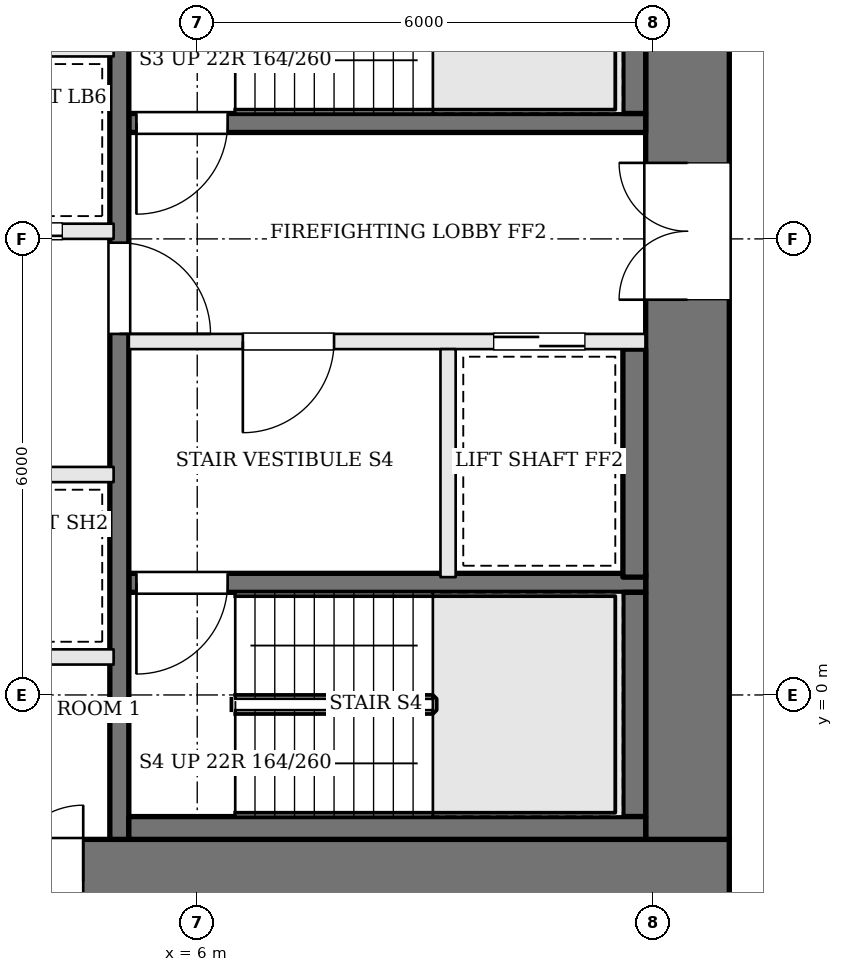
"""IFC4 building model, lengths in metres.
Left out: names, types, materials, properties, quantities, classifications, styles, units other than length and angle.
Written with IfcOpenShell. Run it as: python <this file> out.ifc"""

import sys

from ifc_helpers import new_model, si_unit, direction, frame, frame_2d, origin, place, context, subcontext, project, spatial, rectangle, extrude, element, fill, save


model = new_model("IFC4")
c1 = context("Model", 3, precision=1e-05, world=origin(), true_north=direction((0.0, 1.0)))
c2 = subcontext(c1, "Body", "Model", "MODEL_VIEW")
j1 = project(units=[si_unit("LENGTHUNIT", "METRE"), si_unit("PLANEANGLEUNIT", "RADIAN")], contexts=[c1])
p1 = place(None, origin())
s1 = spatial("IfcSite", under=j1, at=p1, CompositionType="ELEMENT")
p2 = place(p1, origin())
s2 = spatial("IfcBuilding", under=s1, at=p2, CompositionType="ELEMENT")
p3 = place(p2, frame((0.0, 0.0, 85.2)))
s3 = spatial("IfcBuildingStorey", under=s2, at=p3, CompositionType="ELEMENT", Elevation=85.2)
p4 = place(p3, frame((-13.0, -2.45, 0.0), z_axis=(0.0, 0.0, 1.0), x_axis=(1.0, 0.0, 0.0)))
e1 = element("IfcWall", 1, at=p4, inside=s3, PredefinedType="SHEAR", context=c2, shape_type="SweptSolid", body=[
    extrude(rectangle(XDim=26.0, YDim=1.1, at=frame_2d((13.0, 0.0))), origin(), (0.0, 0.0, 1.0), 3.6),
])
p5 = place(p4, frame((9.65, 0.0, 0.0)))
e2 = element("IfcOpeningElement", 2, at=p5, cuts=e1, PredefinedType="OPENING", context=c2, shape_type="SweptSolid", body=[
    extrude(rectangle(XDim=1.0, YDim=2.1, at=frame_2d((0.5, 1.05))), frame((0.0, 0.56, 0.0), z_axis=(0.0, -1.0, 0.0), x_axis=(1.0, 0.0, 0.0)), (0.0, 0.0, 1.0), 1.12),
])
p6 = place(p4, frame((12.925, 0.0, 0.0)))
e3 = element("IfcOpeningElement", 3, at=p6, cuts=e1, PredefinedType="OPENING", context=c2, shape_type="SweptSolid", body=[
    extrude(rectangle(XDim=1.0, YDim=2.1, at=frame_2d((0.5, 1.05))), frame((0.0, 0.56, 0.0), z_axis=(0.0, -1.0, 0.0), x_axis=(1.0, 0.0, 0.0)), (0.0, 0.0, 1.0), 1.12),
])
p7 = place(p4, frame((15.125, 0.0, 0.0)))
e4 = element("IfcOpeningElement", 4, at=p7, cuts=e1, PredefinedType="OPENING", context=c2, shape_type="SweptSolid", body=[
    extrude(rectangle(XDim=0.7, YDim=2.1, at=frame_2d((0.35, 1.05))), frame((0.0, 0.56, 0.0), z_axis=(0.0, -1.0, 0.0), x_axis=(1.0, 0.0, 0.0)), (0.0, 0.0, 1.0), 1.12),
])
p8 = place(p4, frame((16.5, 0.0, 0.0)))
e5 = element("IfcOpeningElement", 5, at=p8, cuts=e1, PredefinedType="OPENING", context=c2, shape_type="SweptSolid", body=[
    extrude(rectangle(XDim=1.0, YDim=2.1, at=frame_2d((0.5, 1.05))), frame((0.0, 0.56, 0.0), z_axis=(0.0, -1.0, 0.0), x_axis=(1.0, 0.0, 0.0)), (0.0, 0.0, 1.0), 1.12),
])
p9 = place(p3, frame((12.45, -1.9, 0.0), z_axis=(0.0, 0.0, 1.0), x_axis=(0.0, 1.0, 0.0)))
e6 = element("IfcWall", 6, at=p9, inside=s3, PredefinedType="SHEAR", context=c2, shape_type="SweptSolid", body=[
    extrude(rectangle(XDim=12.8, YDim=1.1, at=frame_2d((6.4, 0.0))), origin(), (0.0, 0.0, 1.0), 3.6),
])
p10 = place(p9, frame((7.1, 0.0, 0.0)))
e7 = element("IfcOpeningElement", 7, at=p10, cuts=e6, PredefinedType="OPENING", context=c2, shape_type="SweptSolid", body=[
    extrude(rectangle(XDim=1.8, YDim=2.1, at=frame_2d((0.9, 1.05))), frame((0.0, 0.56, 0.0), z_axis=(0.0, -1.0, 0.0), x_axis=(1.0, 0.0, 0.0)), (0.0, 0.0, 1.0), 1.12),
])
p11 = place(p3, frame((11.9, 7.525, 0.0), z_axis=(0.0, 0.0, 1.0), x_axis=(-1.0, 0.0, 0.0)))
e8 = element("IfcWall", 8, at=p11, inside=s3, PredefinedType="SOLIDWALL", context=c2, shape_type="SweptSolid", body=[
    extrude(rectangle(XDim=6.8, YDim=0.25, at=frame_2d((3.4, 0.0))), origin(), (0.0, 0.0, 1.0), 3.4),
])
p12 = place(p11, frame((5.5, 0.0, 0.0)))
e9 = element("IfcOpeningElement", 9, at=p12, cuts=e8, PredefinedType="OPENING", context=c2, shape_type="SweptSolid", body=[
    extrude(rectangle(XDim=1.2, YDim=2.1, at=frame_2d((0.6, 1.05))), frame((0.0, 0.135, 0.0), z_axis=(0.0, -1.0, 0.0), x_axis=(1.0, 0.0, 0.0)), (0.0, 0.0, 1.0), 0.27),
])
p13 = place(p3, frame((11.9, 4.65, 0.0), z_axis=(0.0, 0.0, 1.0), x_axis=(-1.0, 0.0, 0.0)))
e10 = element("IfcWall", 10, at=p13, inside=s3, PredefinedType="SOLIDWALL", context=c2, shape_type="SweptSolid", body=[
    extrude(rectangle(XDim=6.8, YDim=0.2, at=frame_2d((3.4, 0.0))), origin(), (0.0, 0.0, 1.0), 3.4),
])
p14 = place(p13, frame((4.1, 0.0, 0.0)))
e11 = element("IfcOpeningElement", 11, at=p14, cuts=e10, PredefinedType="OPENING", context=c2, shape_type="SweptSolid", body=[
    extrude(rectangle(XDim=1.2, YDim=2.1, at=frame_2d((0.6, 1.05))), frame((0.0, 0.11, 0.0), z_axis=(0.0, -1.0, 0.0), x_axis=(1.0, 0.0, 0.0)), (0.0, 0.0, 1.0), 0.22),
])
p15 = place(p13, frame((0.8, 0.0, 0.0)))
e12 = element("IfcOpeningElement", 12, at=p15, cuts=e10, PredefinedType="OPENING", context=c2, shape_type="SweptSolid", body=[
    extrude(rectangle(XDim=1.2, YDim=2.1, at=frame_2d((0.6, 1.05))), frame((0.0, 0.11, 0.0), z_axis=(0.0, -1.0, 0.0), x_axis=(1.0, 0.0, 0.0)), (0.0, 0.0, 1.0), 0.22),
])
p16 = place(p3, frame((11.9, 1.475, 0.0), z_axis=(0.0, 0.0, 1.0), x_axis=(-1.0, 0.0, 0.0)))
e13 = element("IfcWall", 13, at=p16, inside=s3, PredefinedType="SOLIDWALL", context=c2, shape_type="SweptSolid", body=[
    extrude(rectangle(XDim=6.8, YDim=0.25, at=frame_2d((3.4, 0.0))), origin(), (0.0, 0.0, 1.0), 3.4),
])
p17 = place(p16, frame((5.5, 0.0, 0.0)))
e14 = element("IfcOpeningElement", 14, at=p17, cuts=e13, PredefinedType="OPENING", context=c2, shape_type="SweptSolid", body=[
    extrude(rectangle(XDim=1.2, YDim=2.1, at=frame_2d((0.6, 1.05))), frame((0.0, 0.135, 0.0), z_axis=(0.0, -1.0, 0.0), x_axis=(1.0, 0.0, 0.0)), (0.0, 0.0, 1.0), 0.27),
])
p18 = place(p3, frame((9.3, 4.55, 0.0), z_axis=(0.0, 0.0, 1.0), x_axis=(0.0, -1.0, 0.0)))
e15 = element("IfcWall", 15, at=p18, inside=s3, PredefinedType="SOLIDWALL", context=c2, shape_type="SweptSolid", body=[
    extrude(rectangle(XDim=3.0, YDim=0.2, at=frame_2d((1.5, 0.0))), origin(), (0.0, 0.0, 1.0), 3.4),
])
p19 = place(p3, frame((4.975, 10.9, 0.0), z_axis=(0.0, 0.0, 1.0), x_axis=(0.0, -1.0, 0.0)))
e16 = element("IfcWall", 16, at=p19, inside=s3, PredefinedType="SOLIDWALL", context=c2, shape_type="SweptSolid", body=[
    extrude(rectangle(XDim=12.8, YDim=0.25, at=frame_2d((6.4, 0.0))), origin(), (0.0, 0.0, 1.0), 3.4),
])
p20 = place(p19, frame((4.95, 0.0, 0.0)))
e17 = element("IfcOpeningElement", 17, at=p20, cuts=e16, PredefinedType="OPENING", context=c2, shape_type="SweptSolid", body=[
    extrude(rectangle(XDim=1.2, YDim=2.1, at=frame_2d((0.6, 1.05))), frame((0.0, 0.135, 0.0), z_axis=(0.0, -1.0, 0.0), x_axis=(1.0, 0.0, 0.0)), (0.0, 0.0, 1.0), 0.27),
])
p21 = place(p3, frame((11.75, 10.6, 0.0), z_axis=(0.0, 0.0, 1.0), x_axis=(0.0, -1.0, 0.0)))
e18 = element("IfcWall", 18, at=p21, inside=s3, PredefinedType="SOLIDWALL", context=c2, shape_type="SweptSolid", body=[
    extrude(rectangle(XDim=2.95, YDim=0.3, at=frame_2d((1.475, 0.0))), origin(), (0.0, 0.0, 1.0), 3.4),
])
p22 = place(p3, frame((11.75, 4.55, 0.0), z_axis=(0.0, 0.0, 1.0), x_axis=(0.0, -1.0, 0.0)))
e19 = element("IfcWall", 19, at=p22, inside=s3, PredefinedType="SOLIDWALL", context=c2, shape_type="SweptSolid", body=[
    extrude(rectangle(XDim=3.0, YDim=0.3, at=frame_2d((1.5, 0.0))), origin(), (0.0, 0.0, 1.0), 3.4),
])
p23 = place(p3, frame((11.75, 1.35, 0.0), z_axis=(0.0, 0.0, 1.0), x_axis=(0.0, -1.0, 0.0)))
e20 = element("IfcWall", 20, at=p23, inside=s3, PredefinedType="SOLIDWALL", context=c2, shape_type="SweptSolid", body=[
    extrude(rectangle(XDim=2.95, YDim=0.3, at=frame_2d((1.475, 0.0))), origin(), (0.0, 0.0, 1.0), 3.4),
])
p24 = place(p3, frame((11.9, -1.75, 0.0), z_axis=(0.0, 0.0, 1.0), x_axis=(-1.0, 0.0, 0.0)))
e21 = element("IfcWall", 21, at=p24, inside=s3, PredefinedType="SOLIDWALL", context=c2, shape_type="SweptSolid", body=[
    extrude(rectangle(XDim=6.8, YDim=0.3, at=frame_2d((3.4, 0.0))), origin(), (0.0, 0.0, 1.0), 3.4),
])
p25 = place(p3, frame((-4.9, 0.5, 0.0), z_axis=(0.0, 0.0, 1.0), x_axis=(1.0, 0.0, 0.0)))
e22 = element("IfcWall", 22, at=p25, inside=s3, PredefinedType="SOLIDWALL", context=c2, shape_type="SweptSolid", body=[
    extrude(rectangle(XDim=9.8, YDim=0.2, at=frame_2d((4.9, 0.0))), origin(), (0.0, 0.0, 1.0), 3.4),
])
p26 = place(p3, frame((-4.9, 2.9, 0.0), z_axis=(0.0, 0.0, 1.0), x_axis=(1.0, 0.0, 0.0)))
e23 = element("IfcWall", 23, at=p26, inside=s3, PredefinedType="SOLIDWALL", context=c2, shape_type="SweptSolid", body=[
    extrude(rectangle(XDim=9.8, YDim=0.2, at=frame_2d((4.9, 0.0))), origin(), (0.0, 0.0, 1.0), 3.4),
])
p27 = place(p26, frame((0.675, 0.0, 0.0)))
e24 = element("IfcOpeningElement", 24, at=p27, cuts=e23, PredefinedType="OPENING", context=c2, shape_type="SweptSolid", body=[
    extrude(rectangle(XDim=1.1, YDim=2.1, at=frame_2d((0.55, 1.05))), frame((0.0, 0.11, 0.0), z_axis=(0.0, -1.0, 0.0), x_axis=(1.0, 0.0, 0.0)), (0.0, 0.0, 1.0), 0.22),
])
p28 = place(p26, frame((3.125, 0.0, 0.0)))
e25 = element("IfcOpeningElement", 25, at=p28, cuts=e23, PredefinedType="OPENING", context=c2, shape_type="SweptSolid", body=[
    extrude(rectangle(XDim=1.1, YDim=2.1, at=frame_2d((0.55, 1.05))), frame((0.0, 0.11, 0.0), z_axis=(0.0, -1.0, 0.0), x_axis=(1.0, 0.0, 0.0)), (0.0, 0.0, 1.0), 0.22),
])
p29 = place(p3, frame((-4.9, 6.1, 0.0), z_axis=(0.0, 0.0, 1.0), x_axis=(1.0, 0.0, 0.0)))
e26 = element("IfcWall", 26, at=p29, inside=s3, PredefinedType="SOLIDWALL", context=c2, shape_type="SweptSolid", body=[
    extrude(rectangle(XDim=9.8, YDim=0.2, at=frame_2d((4.9, 0.0))), origin(), (0.0, 0.0, 1.0), 3.4),
])
p30 = place(p29, frame((0.675, 0.0, 0.0)))
e27 = element("IfcOpeningElement", 27, at=p30, cuts=e26, PredefinedType="OPENING", context=c2, shape_type="SweptSolid", body=[
    extrude(rectangle(XDim=1.1, YDim=2.1, at=frame_2d((0.55, 1.05))), frame((0.0, 0.11, 0.0), z_axis=(0.0, -1.0, 0.0), x_axis=(1.0, 0.0, 0.0)), (0.0, 0.0, 1.0), 0.22),
])
p31 = place(p29, frame((3.125, 0.0, 0.0)))
e28 = element("IfcOpeningElement", 28, at=p31, cuts=e26, PredefinedType="OPENING", context=c2, shape_type="SweptSolid", body=[
    extrude(rectangle(XDim=1.1, YDim=2.1, at=frame_2d((0.55, 1.05))), frame((0.0, 0.11, 0.0), z_axis=(0.0, -1.0, 0.0), x_axis=(1.0, 0.0, 0.0)), (0.0, 0.0, 1.0), 0.22),
])
p32 = place(p29, frame((5.575, 0.0, 0.0)))
e29 = element("IfcOpeningElement", 29, at=p32, cuts=e26, PredefinedType="OPENING", context=c2, shape_type="SweptSolid", body=[
    extrude(rectangle(XDim=1.1, YDim=2.1, at=frame_2d((0.55, 1.05))), frame((0.0, 0.11, 0.0), z_axis=(0.0, -1.0, 0.0), x_axis=(1.0, 0.0, 0.0)), (0.0, 0.0, 1.0), 0.22),
])
p33 = place(p29, frame((8.025, 0.0, 0.0)))
e30 = element("IfcOpeningElement", 30, at=p33, cuts=e26, PredefinedType="OPENING", context=c2, shape_type="SweptSolid", body=[
    extrude(rectangle(XDim=1.1, YDim=2.1, at=frame_2d((0.55, 1.05))), frame((0.0, 0.11, 0.0), z_axis=(0.0, -1.0, 0.0), x_axis=(1.0, 0.0, 0.0)), (0.0, 0.0, 1.0), 0.22),
])
p34 = place(p3, frame((-4.9, 8.5, 0.0), z_axis=(0.0, 0.0, 1.0), x_axis=(1.0, 0.0, 0.0)))
e31 = element("IfcWall", 31, at=p34, inside=s3, PredefinedType="SOLIDWALL", context=c2, shape_type="SweptSolid", body=[
    extrude(rectangle(XDim=9.8, YDim=0.2, at=frame_2d((4.9, 0.0))), origin(), (0.0, 0.0, 1.0), 3.4),
])
p35 = place(p10, origin())
e32 = element("IfcDoor", 32, at=p35, inside=s3, OperationType="DOUBLE_DOOR_SINGLE_SWING", PredefinedType="DOOR", context=c2, shape_type="SweptSolid", body=[
    extrude(rectangle(XDim=1.8, YDim=2.1, at=frame_2d((0.9, 1.05))), frame((0.0, 0.025, 0.0), z_axis=(0.0, -1.0, 0.0), x_axis=(1.0, 0.0, 0.0)), (0.0, 0.0, 1.0), 0.05),
])
fill(e7, e32)
p36 = place(p20, origin())
e33 = element("IfcDoor", 33, at=p36, inside=s3, OperationType="SINGLE_SWING_RIGHT", PredefinedType="DOOR", context=c2, shape_type="SweptSolid", body=[
    extrude(rectangle(XDim=1.2, YDim=2.1, at=frame_2d((0.6, 1.05))), frame((0.0, 0.025, 0.0), z_axis=(0.0, -1.0, 0.0), x_axis=(1.0, 0.0, 0.0)), (0.0, 0.0, 1.0), 0.05),
])
fill(e17, e33)
p37 = place(p14, origin())
e34 = element("IfcDoor", 34, at=p37, inside=s3, OperationType="SINGLE_SWING_RIGHT", PredefinedType="DOOR", context=c2, shape_type="SweptSolid", body=[
    extrude(rectangle(XDim=1.2, YDim=2.1, at=frame_2d((0.6, 1.05))), frame((0.0, 0.025, 0.0), z_axis=(0.0, -1.0, 0.0), x_axis=(1.0, 0.0, 0.0)), (0.0, 0.0, 1.0), 0.05),
])
fill(e11, e34)
p38 = place(p12, origin())
e35 = element("IfcDoor", 35, at=p38, inside=s3, OperationType="SINGLE_SWING_RIGHT", PredefinedType="DOOR", context=c2, shape_type="SweptSolid", body=[
    extrude(rectangle(XDim=1.2, YDim=2.1, at=frame_2d((0.6, 1.05))), frame((0.0, 0.025, 0.0), z_axis=(0.0, -1.0, 0.0), x_axis=(1.0, 0.0, 0.0)), (0.0, 0.0, 1.0), 0.05),
])
fill(e9, e35)
p39 = place(p17, origin())
e36 = element("IfcDoor", 36, at=p39, inside=s3, OperationType="SINGLE_SWING_RIGHT", PredefinedType="DOOR", context=c2, shape_type="SweptSolid", body=[
    extrude(rectangle(XDim=1.2, YDim=2.1, at=frame_2d((0.6, 1.05))), frame((0.0, 0.025, 0.0), z_axis=(0.0, -1.0, 0.0), x_axis=(1.0, 0.0, 0.0)), (0.0, 0.0, 1.0), 0.05),
])
fill(e14, e36)
p40 = place(p15, origin())
e37 = element("IfcDoor", 37, at=p40, inside=s3, OperationType="SLIDING_TO_RIGHT", PredefinedType="DOOR", context=c2, shape_type="SweptSolid", body=[
    extrude(rectangle(XDim=1.2, YDim=2.1, at=frame_2d((0.6, 1.05))), frame((0.0, 0.025, 0.0), z_axis=(0.0, -1.0, 0.0), x_axis=(1.0, 0.0, 0.0)), (0.0, 0.0, 1.0), 0.05),
])
fill(e12, e37)
p41 = place(p33, origin())
e38 = element("IfcDoor", 38, at=p41, inside=s3, OperationType="SLIDING_TO_LEFT", PredefinedType="DOOR", context=c2, shape_type="SweptSolid", body=[
    extrude(rectangle(XDim=1.1, YDim=2.1, at=frame_2d((0.55, 1.05))), frame((0.0, 0.025, 0.0), z_axis=(0.0, -1.0, 0.0), x_axis=(1.0, 0.0, 0.0)), (0.0, 0.0, 1.0), 0.05),
])
fill(e30, e38)
p42 = place(p8, origin())
e39 = element("IfcDoor", 39, at=p42, inside=s3, OperationType="SINGLE_SWING_RIGHT", PredefinedType="DOOR", context=c2, shape_type="SweptSolid", body=[
    extrude(rectangle(XDim=1.0, YDim=2.1, at=frame_2d((0.5, 1.05))), frame((0.0, 0.025, 0.0), z_axis=(0.0, -1.0, 0.0), x_axis=(1.0, 0.0, 0.0)), (0.0, 0.0, 1.0), 0.05),
])
fill(e5, e39)
save(model, sys.argv[1])
